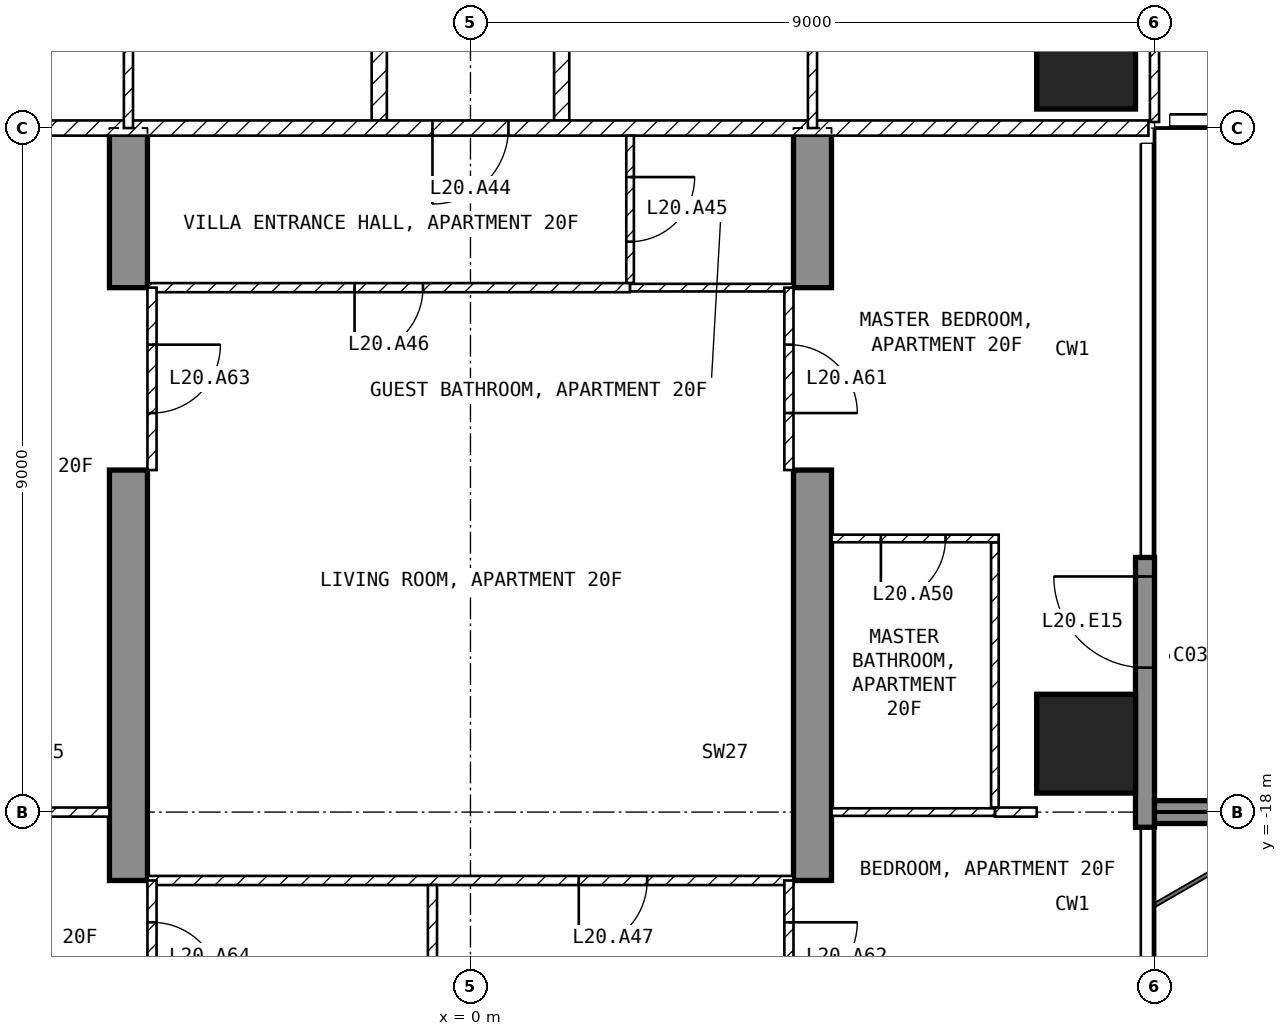
"""IFC4 building model, lengths in metres.
Left out: names, types, materials, properties, quantities, classifications, styles, units other than length and angle.
Written with IfcOpenShell. Run it as: python <this file> out.ifc"""

import sys

from ifc_helpers import new_model, si_unit, direction, frame, frame_2d, origin, origin_2d, place, context, subcontext, project, spatial, polyline, rectangle, outline, extrude, element, fill, save


model = new_model("IFC4")
c1 = context("Model", 3, precision=1e-05, world=origin(), true_north=direction((0.0, 1.0)))
c2 = subcontext(c1, "Body", "Model", "MODEL_VIEW")
j1 = project(units=[si_unit("LENGTHUNIT", "METRE"), si_unit("PLANEANGLEUNIT", "RADIAN")], contexts=[c1])
p1 = place(None, origin())
s1 = spatial("IfcSite", under=j1, at=p1, CompositionType="ELEMENT")
p2 = place(p1, origin())
s2 = spatial("IfcBuilding", under=s1, at=p2, CompositionType="ELEMENT")
p3 = place(p2, frame((0.0, 0.0, 89.0)))
s3 = spatial("IfcBuildingStorey", under=s2, at=p3, CompositionType="ELEMENT", Elevation=89.0)
for number, where, z_axis, x_axis in (
    (1, (8.1, -17.1, -0.25), (0.0, 0.0, 1.0), (1.0, 0.0, 0.0)),
    (2, (8.1, -8.1, -0.25), (0.0, 0.0, 1.0), (1.0, 0.0, 0.0)),
):
    element("IfcColumn", number, at=place(p3, frame(where, z_axis=z_axis, x_axis=x_axis)), inside=s3, PredefinedType="COLUMN", context=c2, shape_type="SweptSolid", body=[
        extrude(rectangle(XDim=1.3, YDim=1.3, at=origin_2d()), origin(), (0.0, 0.0, 1.0), 3.45),
    ])
for number, where, z_axis, x_axis in (
    (3, (-4.75, -25.45, -0.25), (1.0, 0.0, 0.0), (0.0, 1.0, 0.0)),
    (4, (4.25, -25.45, -0.25), (1.0, 0.0, 0.0), (0.0, 1.0, 0.0)),
):
    element("IfcWall", number, at=place(p3, frame(where, z_axis=z_axis, x_axis=x_axis)), inside=s3, PredefinedType="SHEAR", context=c2, shape_type="SweptSolid", body=[
        extrude(outline(polyline([(0.0, 0.0), (4.15, 0.0), (4.15, 2.65), (6.55, 2.65), (6.55, 0.0), (11.95, 0.0), (11.95, 2.65), (14.35, 2.65), (14.35, 0.0), (16.45, 0.0), (16.45, 3.45), (0.0, 3.45), (0.0, 0.0)])), origin(), (0.0, 0.0, 1.0), 0.5),
    ])
p4 = place(p3, frame((8.875, -18.2, 0.0), z_axis=(0.0, 0.0, 1.0), x_axis=(0.0, 1.0, 0.0)))
e5 = element("IfcWall", 5, at=p4, inside=s3, PredefinedType="SOLIDWALL", context=c2, shape_type="SweptSolid", body=[
    extrude(rectangle(XDim=3.55, YDim=0.25, at=frame_2d((1.775, 0.0))), origin(), (0.0, 0.0, 1.0), 3.2),
])
p5 = place(p4, frame((2.1, 0.0, 0.0)))
e6 = element("IfcOpeningElement", 6, at=p5, cuts=e5, PredefinedType="OPENING", context=c2, shape_type="SweptSolid", body=[
    extrude(rectangle(XDim=1.2, YDim=2.4, at=frame_2d((0.6, 1.2))), frame((0.0, 0.135, 0.0), z_axis=(0.0, -1.0, 0.0), x_axis=(1.0, 0.0, 0.0)), (0.0, 0.0, 1.0), 0.27),
])
p6 = place(p3, frame((9.0, -18.0, 0.0), z_axis=(0.0, 0.0, 1.0), x_axis=(1.0, 0.0, 0.0)))
e7 = element("IfcWall", 7, at=p6, inside=s3, PredefinedType="SOLIDWALL", context=c2, shape_type="SweptSolid", body=[
    extrude(rectangle(XDim=2.7, YDim=0.3, at=frame_2d((1.35, 0.0))), origin(), (0.0, 0.0, 1.0), 3.2),
])
for number, where, z_axis, x_axis in (
    (8, (1.2, -1.3, 0.0), (0.0, 0.0, 1.0), (0.0, -1.0, 0.0)),
    (9, (-1.2, -8.9, 0.0), (0.0, 0.0, 1.0), (0.0, 1.0, 0.0)),
):
    element("IfcWall", number, at=place(p3, frame(where, z_axis=z_axis, x_axis=x_axis)), inside=s3, PredefinedType="PARTITIONING", context=c2, shape_type="SweptSolid", body=[
        extrude(rectangle(XDim=7.6, YDim=0.2, at=frame_2d((3.8, 0.0))), origin(), (0.0, 0.0, 1.0), 3.2),
    ])
p7 = place(p3, frame((8.92, -9.0, 0.0), z_axis=(0.0, 0.0, 1.0), x_axis=(-1.0, 0.0, 0.0)))
e10 = element("IfcWall", 10, at=p7, inside=s3, PredefinedType="PARTITIONING", context=c2, shape_type="SweptSolid", body=[
    extrude(rectangle(XDim=17.84, YDim=0.2, at=frame_2d((8.92, 0.0))), origin(), (0.0, 0.0, 1.0), 3.2),
])
p8 = place(p7, frame((8.42, 0.0, 0.0)))
e11 = element("IfcOpeningElement", 11, at=p8, cuts=e10, PredefinedType="OPENING", context=c2, shape_type="SweptSolid", body=[
    extrude(rectangle(XDim=1.0, YDim=2.1, at=frame_2d((0.5, 1.05))), frame((0.0, 0.11, 0.0), z_axis=(0.0, -1.0, 0.0), x_axis=(1.0, 0.0, 0.0)), (0.0, 0.0, 1.0), 0.22),
])
p9 = place(p3, frame((9.0, -8.92, 0.0), z_axis=(0.0, 0.0, 1.0), x_axis=(0.0, 1.0, 0.0)))
e12 = element("IfcWall", 12, at=p9, inside=s3, PredefinedType="PARTITIONING", context=c2, shape_type="SweptSolid", body=[
    extrude(rectangle(XDim=7.62, YDim=0.12, at=frame_2d((3.81, 0.0))), origin(), (0.0, 0.0, 1.0), 3.2),
])
p10 = place(p9, frame((5.72, 0.0, 0.0)))
e13 = element("IfcOpeningElement", 13, at=p10, cuts=e12, PredefinedType="OPENING", context=c2, shape_type="SweptSolid", body=[
    extrude(rectangle(XDim=0.9, YDim=2.1, at=frame_2d((0.45, 1.05))), frame((0.0, 0.07, 0.0), z_axis=(0.0, -1.0, 0.0), x_axis=(1.0, 0.0, 0.0)), (0.0, 0.0, 1.0), 0.14),
])
p11 = place(p9, frame((2.682, 0.0, 0.0)))
e14 = element("IfcOpeningElement", 14, at=p11, cuts=e12, PredefinedType="OPENING", context=c2, shape_type="SweptSolid", body=[
    extrude(rectangle(XDim=0.9, YDim=2.1, at=frame_2d((0.45, 1.05))), frame((0.0, 0.07, 0.0), z_axis=(0.0, -1.0, 0.0), x_axis=(1.0, 0.0, 0.0)), (0.0, 0.0, 1.0), 0.14),
])
p12 = place(p3, frame((4.5, -9.0, 0.0), z_axis=(0.0, 0.0, 1.0), x_axis=(0.0, 1.0, 0.0)))
e15 = element("IfcWall", 15, at=p12, inside=s3, PredefinedType="PARTITIONING", context=c2, shape_type="SweptSolid", body=[
    extrude(rectangle(XDim=7.7, YDim=0.12, at=frame_2d((3.85, 0.0))), origin(), (0.0, 0.0, 1.0), 3.2),
])
p13 = place(p12, frame((1.812, 0.0, 0.0)))
e16 = element("IfcOpeningElement", 16, at=p13, cuts=e15, PredefinedType="OPENING", context=c2, shape_type="SweptSolid", body=[
    extrude(rectangle(XDim=0.9, YDim=2.1, at=frame_2d((0.45, 1.05))), frame((0.0, 0.07, 0.0), z_axis=(0.0, -1.0, 0.0), x_axis=(1.0, 0.0, 0.0)), (0.0, 0.0, 1.0), 0.14),
])
p14 = place(p3, frame((-4.5, -1.3, 0.0), z_axis=(0.0, 0.0, 1.0), x_axis=(0.0, -1.0, 0.0)))
e17 = element("IfcWall", 17, at=p14, inside=s3, PredefinedType="PARTITIONING", context=c2, shape_type="SweptSolid", body=[
    extrude(rectangle(XDim=7.7, YDim=0.12, at=frame_2d((3.85, 0.0))), origin(), (0.0, 0.0, 1.0), 3.2),
])
p15 = place(p14, frame((4.988, 0.0, 0.0)))
e18 = element("IfcOpeningElement", 18, at=p15, cuts=e17, PredefinedType="OPENING", context=c2, shape_type="SweptSolid", body=[
    extrude(rectangle(XDim=0.9, YDim=2.1, at=frame_2d((0.45, 1.05))), frame((0.0, 0.07, 0.0), z_axis=(0.0, -1.0, 0.0), x_axis=(1.0, 0.0, 0.0)), (0.0, 0.0, 1.0), 0.14),
])
p16 = place(p3, frame((2.1, -9.1, 0.0), z_axis=(0.0, 0.0, 1.0), x_axis=(0.0, -1.0, 0.0)))
e19 = element("IfcWall", 19, at=p16, inside=s3, PredefinedType="PARTITIONING", context=c2, shape_type="SweptSolid", body=[
    extrude(rectangle(XDim=1.94, YDim=0.1, at=frame_2d((0.97, 0.0))), origin(), (0.0, 0.0, 1.0), 3.2),
])
p17 = place(p16, frame((0.545, 0.0, 0.0)))
e20 = element("IfcOpeningElement", 20, at=p17, cuts=e19, PredefinedType="OPENING", context=c2, shape_type="SweptSolid", body=[
    extrude(rectangle(XDim=0.85, YDim=2.1, at=frame_2d((0.425, 1.05))), frame((0.0, 0.06, 0.0), z_axis=(0.0, -1.0, 0.0), x_axis=(1.0, 0.0, 0.0)), (0.0, 0.0, 1.0), 0.12),
])
p18 = place(p3, frame((2.1, -11.1, 0.0), z_axis=(0.0, 0.0, 1.0), x_axis=(-1.0, 0.0, 0.0)))
e21 = element("IfcWall", 21, at=p18, inside=s3, PredefinedType="PARTITIONING", context=c2, shape_type="SweptSolid", body=[
    extrude(rectangle(XDim=6.35, YDim=0.12, at=frame_2d((3.175, 0.0))), origin(), (0.0, 0.0, 1.0), 3.2),
])
p19 = place(p18, frame((2.725, 0.0, 0.0)))
e22 = element("IfcOpeningElement", 22, at=p19, cuts=e21, PredefinedType="OPENING", context=c2, shape_type="SweptSolid", body=[
    extrude(rectangle(XDim=0.9, YDim=2.1, at=frame_2d((0.45, 1.05))), frame((0.0, 0.07, 0.0), z_axis=(0.0, -1.0, 0.0), x_axis=(1.0, 0.0, 0.0)), (0.0, 0.0, 1.0), 0.14),
])
p20 = place(p3, frame((4.25, -11.1, 0.0), z_axis=(0.0, 0.0, 1.0), x_axis=(-1.0, 0.0, 0.0)))
e23 = element("IfcWall", 23, at=p20, inside=s3, PredefinedType="PARTITIONING", context=c2, shape_type="SweptSolid", body=[
    extrude(rectangle(XDim=2.15, YDim=0.1, at=frame_2d((1.075, 0.0))), origin(), (0.0, 0.0, 1.0), 3.2),
])
p21 = place(p3, frame((4.25, -18.9, 0.0), z_axis=(0.0, 0.0, 1.0), x_axis=(-1.0, 0.0, 0.0)))
e24 = element("IfcWall", 24, at=p21, inside=s3, PredefinedType="PARTITIONING", context=c2, shape_type="SweptSolid", body=[
    extrude(rectangle(XDim=8.5, YDim=0.12, at=frame_2d((4.25, 0.0))), origin(), (0.0, 0.0, 1.0), 3.2),
])
p22 = place(p21, frame((1.925, 0.0, 0.0)))
e25 = element("IfcOpeningElement", 25, at=p22, cuts=e24, PredefinedType="OPENING", context=c2, shape_type="SweptSolid", body=[
    extrude(rectangle(XDim=0.9, YDim=2.1, at=frame_2d((0.45, 1.05))), frame((0.0, 0.07, 0.0), z_axis=(0.0, -1.0, 0.0), x_axis=(1.0, 0.0, 0.0)), (0.0, 0.0, 1.0), 0.14),
])
p23 = place(p3, frame((-0.5, -23.34, 0.0), z_axis=(0.0, 0.0, 1.0), x_axis=(0.0, 1.0, 0.0)))
e26 = element("IfcWall", 26, at=p23, inside=s3, PredefinedType="PARTITIONING", context=c2, shape_type="SweptSolid", body=[
    extrude(rectangle(XDim=4.38, YDim=0.12, at=frame_2d((2.19, 0.0))), origin(), (0.0, 0.0, 1.0), 3.2),
])
p24 = place(p23, frame((1.74, 0.0, 0.0)))
e27 = element("IfcOpeningElement", 27, at=p24, cuts=e26, PredefinedType="OPENING", context=c2, shape_type="SweptSolid", body=[
    extrude(rectangle(XDim=0.9, YDim=2.1, at=frame_2d((0.45, 1.05))), frame((0.0, 0.07, 0.0), z_axis=(0.0, -1.0, 0.0), x_axis=(1.0, 0.0, 0.0)), (0.0, 0.0, 1.0), 0.14),
])
p25 = place(p3, frame((6.9, -17.94, 0.0), z_axis=(0.0, 0.0, 1.0), x_axis=(0.0, 1.0, 0.0)))
e28 = element("IfcWall", 28, at=p25, inside=s3, PredefinedType="PARTITIONING", context=c2, shape_type="SweptSolid", body=[
    extrude(rectangle(XDim=3.49, YDim=0.1, at=frame_2d((1.745, 0.0))), origin(), (0.0, 0.0, 1.0), 3.2),
])
p26 = place(p3, frame((6.95, -14.4, 0.0), z_axis=(0.0, 0.0, 1.0), x_axis=(-1.0, 0.0, 0.0)))
e29 = element("IfcWall", 29, at=p26, inside=s3, PredefinedType="PARTITIONING", context=c2, shape_type="SweptSolid", body=[
    extrude(rectangle(XDim=2.2, YDim=0.1, at=frame_2d((1.1, 0.0))), origin(), (0.0, 0.0, 1.0), 3.2),
])
p27 = place(p26, frame((0.7, 0.0, 0.0)))
e30 = element("IfcOpeningElement", 30, at=p27, cuts=e29, PredefinedType="OPENING", context=c2, shape_type="SweptSolid", body=[
    extrude(rectangle(XDim=0.85, YDim=2.1, at=frame_2d((0.425, 1.05))), frame((0.0, 0.06, 0.0), z_axis=(0.0, -1.0, 0.0), x_axis=(1.0, 0.0, 0.0)), (0.0, 0.0, 1.0), 0.12),
])
p28 = place(p3, frame((7.45, -18.0, 0.0), z_axis=(0.0, 0.0, 1.0), x_axis=(-1.0, 0.0, 0.0)))
e31 = element("IfcWall", 31, at=p28, inside=s3, PredefinedType="PARTITIONING", context=c2, shape_type="SweptSolid", body=[
    extrude(rectangle(XDim=0.55, YDim=0.12, at=frame_2d((0.275, 0.0))), origin(), (0.0, 0.0, 1.0), 3.2),
])
p29 = place(p3, frame((6.9, -18.0, 0.0), z_axis=(0.0, 0.0, 1.0), x_axis=(-1.0, 0.0, 0.0)))
e32 = element("IfcWall", 32, at=p29, inside=s3, PredefinedType="PARTITIONING", context=c2, shape_type="SweptSolid", body=[
    extrude(rectangle(XDim=2.15, YDim=0.1, at=frame_2d((1.075, 0.0))), origin(), (0.0, 0.0, 1.0), 3.2),
])
p30 = place(p3, frame((-4.75, -18.0, 0.0), z_axis=(0.0, 0.0, 1.0), x_axis=(-1.0, 0.0, 0.0)))
e33 = element("IfcWall", 33, at=p30, inside=s3, PredefinedType="PARTITIONING", context=c2, shape_type="SweptSolid", body=[
    extrude(rectangle(XDim=2.7, YDim=0.12, at=frame_2d((1.35, 0.0))), origin(), (0.0, 0.0, 1.0), 3.2),
])
p31 = place(p3, frame((4.19, -11.1, 0.0), z_axis=(0.0, 0.0, 1.0), x_axis=(0.0, -1.0, 0.0)))
e34 = element("IfcWall", 34, at=p31, inside=s3, PredefinedType="PARTITIONING", context=c2, shape_type="SweptSolid", body=[
    extrude(rectangle(XDim=2.4, YDim=0.12, at=frame_2d((1.2, 0.0))), origin(), (0.0, 0.0, 1.0), 2.4),
])
p32 = place(p31, frame((0.75, 0.0, 0.0)))
e35 = element("IfcOpeningElement", 35, at=p32, cuts=e34, PredefinedType="OPENING", context=c2, shape_type="SweptSolid", body=[
    extrude(rectangle(XDim=0.9, YDim=2.1, at=frame_2d((0.45, 1.05))), frame((0.0, 0.07, 0.0), z_axis=(0.0, -1.0, 0.0), x_axis=(1.0, 0.0, 0.0)), (0.0, 0.0, 1.0), 0.14),
])
p33 = place(p3, frame((4.19, -18.9, 0.0), z_axis=(0.0, 0.0, 1.0), x_axis=(0.0, -1.0, 0.0)))
e36 = element("IfcWall", 36, at=p33, inside=s3, PredefinedType="PARTITIONING", context=c2, shape_type="SweptSolid", body=[
    extrude(rectangle(XDim=2.4, YDim=0.12, at=frame_2d((1.2, 0.0))), origin(), (0.0, 0.0, 1.0), 2.4),
])
p34 = place(p33, frame((0.55, 0.0, 0.0)))
e37 = element("IfcOpeningElement", 37, at=p34, cuts=e36, PredefinedType="OPENING", context=c2, shape_type="SweptSolid", body=[
    extrude(rectangle(XDim=0.9, YDim=2.1, at=frame_2d((0.45, 1.05))), frame((0.0, 0.07, 0.0), z_axis=(0.0, -1.0, 0.0), x_axis=(1.0, 0.0, 0.0)), (0.0, 0.0, 1.0), 0.14),
])
p35 = place(p3, frame((-4.19, -11.1, 0.0), z_axis=(0.0, 0.0, 1.0), x_axis=(0.0, -1.0, 0.0)))
e38 = element("IfcWall", 38, at=p35, inside=s3, PredefinedType="PARTITIONING", context=c2, shape_type="SweptSolid", body=[
    extrude(rectangle(XDim=2.4, YDim=0.12, at=frame_2d((1.2, 0.0))), origin(), (0.0, 0.0, 1.0), 2.4),
])
p36 = place(p35, frame((0.75, 0.0, 0.0)))
e39 = element("IfcOpeningElement", 39, at=p36, cuts=e38, PredefinedType="OPENING", context=c2, shape_type="SweptSolid", body=[
    extrude(rectangle(XDim=0.9, YDim=2.1, at=frame_2d((0.45, 1.05))), frame((0.0, 0.07, 0.0), z_axis=(0.0, -1.0, 0.0), x_axis=(1.0, 0.0, 0.0)), (0.0, 0.0, 1.0), 0.14),
])
p37 = place(p3, frame((-4.19, -18.9, 0.0), z_axis=(0.0, 0.0, 1.0), x_axis=(0.0, -1.0, 0.0)))
e40 = element("IfcWall", 40, at=p37, inside=s3, PredefinedType="PARTITIONING", context=c2, shape_type="SweptSolid", body=[
    extrude(rectangle(XDim=2.4, YDim=0.12, at=frame_2d((1.2, 0.0))), origin(), (0.0, 0.0, 1.0), 2.4),
])
p38 = place(p37, frame((0.55, 0.0, 0.0)))
e41 = element("IfcOpeningElement", 41, at=p38, cuts=e40, PredefinedType="OPENING", context=c2, shape_type="SweptSolid", body=[
    extrude(rectangle(XDim=0.9, YDim=2.1, at=frame_2d((0.45, 1.05))), frame((0.0, 0.07, 0.0), z_axis=(0.0, -1.0, 0.0), x_axis=(1.0, 0.0, 0.0)), (0.0, 0.0, 1.0), 0.14),
])
p39 = place(p5, origin())
e42 = element("IfcDoor", 42, at=p39, inside=s3, OperationType="SINGLE_SWING_RIGHT", PredefinedType="DOOR", context=c2, shape_type="SweptSolid", body=[
    extrude(rectangle(XDim=1.2, YDim=2.4, at=frame_2d((0.6, 1.2))), frame((0.0, 0.025, 0.0), z_axis=(0.0, -1.0, 0.0), x_axis=(1.0, 0.0, 0.0)), (0.0, 0.0, 1.0), 0.05),
])
fill(e6, e42)
p40 = place(p8, origin())
e43 = element("IfcDoor", 43, at=p40, inside=s3, OperationType="SINGLE_SWING_RIGHT", PredefinedType="DOOR", context=c2, shape_type="SweptSolid", body=[
    extrude(rectangle(XDim=1.0, YDim=2.1, at=frame_2d((0.5, 1.05))), frame((0.0, 0.025, 0.0), z_axis=(0.0, -1.0, 0.0), x_axis=(1.0, 0.0, 0.0)), (0.0, 0.0, 1.0), 0.05),
])
fill(e11, e43)
p41 = place(p17, origin())
e44 = element("IfcDoor", 44, at=p41, inside=s3, OperationType="SINGLE_SWING_LEFT", PredefinedType="DOOR", context=c2, shape_type="SweptSolid", body=[
    extrude(rectangle(XDim=0.85, YDim=2.1, at=frame_2d((0.425, 1.05))), frame((0.0, 0.025, 0.0), z_axis=(0.0, -1.0, 0.0), x_axis=(1.0, 0.0, 0.0)), (0.0, 0.0, 1.0), 0.05),
])
fill(e20, e44)
p42 = place(p19, origin())
e45 = element("IfcDoor", 45, at=p42, inside=s3, OperationType="SINGLE_SWING_RIGHT", PredefinedType="DOOR", context=c2, shape_type="SweptSolid", body=[
    extrude(rectangle(XDim=0.9, YDim=2.1, at=frame_2d((0.45, 1.05))), frame((0.0, 0.025, 0.0), z_axis=(0.0, -1.0, 0.0), x_axis=(1.0, 0.0, 0.0)), (0.0, 0.0, 1.0), 0.05),
])
fill(e22, e45)
p43 = place(p22, origin())
e46 = element("IfcDoor", 46, at=p43, inside=s3, OperationType="SINGLE_SWING_RIGHT", PredefinedType="DOOR", context=c2, shape_type="SweptSolid", body=[
    extrude(rectangle(XDim=0.9, YDim=2.1, at=frame_2d((0.45, 1.05))), frame((0.0, 0.025, 0.0), z_axis=(0.0, -1.0, 0.0), x_axis=(1.0, 0.0, 0.0)), (0.0, 0.0, 1.0), 0.05),
])
fill(e25, e46)
p44 = place(p27, origin())
e47 = element("IfcDoor", 47, at=p44, inside=s3, OperationType="SINGLE_SWING_RIGHT", PredefinedType="DOOR", context=c2, shape_type="SweptSolid", body=[
    extrude(rectangle(XDim=0.85, YDim=2.1, at=frame_2d((0.425, 1.05))), frame((0.0, 0.025, 0.0), z_axis=(0.0, -1.0, 0.0), x_axis=(1.0, 0.0, 0.0)), (0.0, 0.0, 1.0), 0.05),
])
fill(e30, e47)
p45 = place(p32, origin())
e48 = element("IfcDoor", 48, at=p45, inside=s3, OperationType="SINGLE_SWING_RIGHT", PredefinedType="DOOR", context=c2, shape_type="SweptSolid", body=[
    extrude(rectangle(XDim=0.9, YDim=2.1, at=frame_2d((0.45, 1.05))), frame((0.0, 0.025, 0.0), z_axis=(0.0, -1.0, 0.0), x_axis=(1.0, 0.0, 0.0)), (0.0, 0.0, 1.0), 0.05),
])
fill(e35, e48)
p46 = place(p34, origin())
e49 = element("IfcDoor", 49, at=p46, inside=s3, OperationType="SINGLE_SWING_LEFT", PredefinedType="DOOR", context=c2, shape_type="SweptSolid", body=[
    extrude(rectangle(XDim=0.9, YDim=2.1, at=frame_2d((0.45, 1.05))), frame((0.0, 0.025, 0.0), z_axis=(0.0, -1.0, 0.0), x_axis=(1.0, 0.0, 0.0)), (0.0, 0.0, 1.0), 0.05),
])
fill(e37, e49)
p47 = place(p36, origin())
e50 = element("IfcDoor", 50, at=p47, inside=s3, OperationType="SINGLE_SWING_LEFT", PredefinedType="DOOR", context=c2, shape_type="SweptSolid", body=[
    extrude(rectangle(XDim=0.9, YDim=2.1, at=frame_2d((0.45, 1.05))), frame((0.0, 0.025, 0.0), z_axis=(0.0, -1.0, 0.0), x_axis=(1.0, 0.0, 0.0)), (0.0, 0.0, 1.0), 0.05),
])
fill(e39, e50)
p48 = place(p38, origin())
e51 = element("IfcDoor", 51, at=p48, inside=s3, OperationType="SINGLE_SWING_RIGHT", PredefinedType="DOOR", context=c2, shape_type="SweptSolid", body=[
    extrude(rectangle(XDim=0.9, YDim=2.1, at=frame_2d((0.45, 1.05))), frame((0.0, 0.025, 0.0), z_axis=(0.0, -1.0, 0.0), x_axis=(1.0, 0.0, 0.0)), (0.0, 0.0, 1.0), 0.05),
])
fill(e41, e51)
save(model, sys.argv[1])
